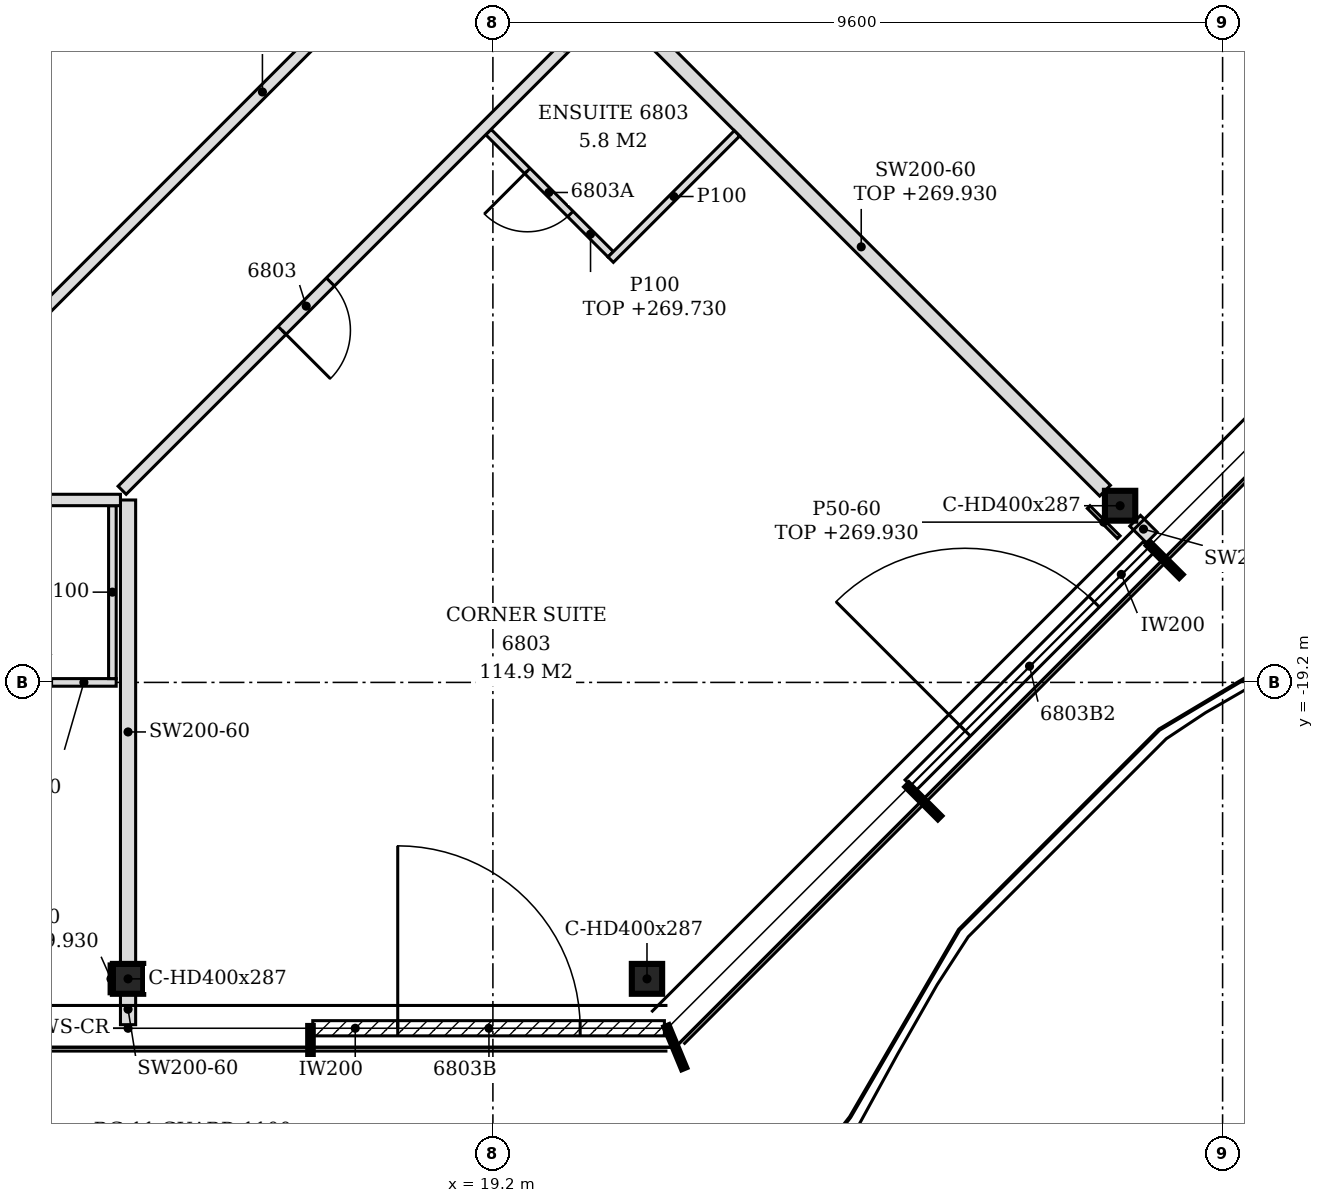
"""IFC4 building model, lengths in metres.
Left out: names, types, materials, properties, quantities, classifications, styles, units other than length and angle.
Written with IfcOpenShell. Run it as: python <this file> out.ifc"""

import sys

from ifc_helpers import new_model, si_unit, direction, frame, frame_2d, origin, origin_2d, place, context, subcontext, project, spatial, polyline, rectangle, i_section, outline, extrude, element, fill, save


model = new_model("IFC4")
c1 = context("Model", 3, precision=1e-05, world=origin(), true_north=direction((0.0, 1.0)))
c2 = subcontext(c1, "Body", "Model", "MODEL_VIEW")
j1 = project(units=[si_unit("LENGTHUNIT", "METRE"), si_unit("PLANEANGLEUNIT", "RADIAN")], contexts=[c1])
p1 = place(None, origin())
s1 = spatial("IfcSite", under=j1, at=p1, CompositionType="ELEMENT")
p2 = place(p1, origin())
s2 = spatial("IfcBuilding", under=s1, at=p2, CompositionType="ELEMENT")
p3 = place(p2, frame((0.0, 0.0, 267.0)))
s3 = spatial("IfcBuildingStorey", under=s2, at=p3, CompositionType="ELEMENT", Elevation=267.0)
for number, where, z_axis, x_axis in (
    (1, (14.4, -23.1, -0.15), (0.0, 0.0, 1.0), (1.0, 0.0, 0.0)),
    (2, (21.227, -23.1, -0.15), (0.0, 0.0, 1.0), (1.0, 0.0, 0.0)),
    (3, (27.451, -16.876, -0.15), (0.0, 0.0, 1.0), (1.0, 0.0, 0.0)),
):
    element("IfcColumn", number, at=place(p3, frame(where, z_axis=z_axis, x_axis=x_axis)), inside=s3, PredefinedType="COLUMN", context=c2, shape_type="SweptSolid", body=[
        extrude(i_section(OverallWidth=0.399, OverallDepth=0.393, WebThickness=0.023, FlangeThickness=0.037, FilletRadius=0.015, at=origin_2d()), origin(), (0.0, 0.0, 1.0), 3.6),
    ])
p4 = place(p3, frame((16.83, -23.75, 0.0), z_axis=(0.0, 0.0, 1.0), x_axis=(1.0, 0.0, 0.0)))
e4 = element("IfcWall", 4, at=p4, inside=s3, PredefinedType="NOTDEFINED", context=c2, shape_type="SweptSolid", body=[
    extrude(rectangle(XDim=4.626, YDim=0.2, at=frame_2d((2.313, 0.0))), origin(), (0.0, 0.0, 1.0), 3.45),
])
p5 = place(p4, frame((1.118, 0.0, 0.0)))
e5 = element("IfcOpeningElement", 5, at=p5, cuts=e4, PredefinedType="OPENING", context=c2, shape_type="SweptSolid", body=[
    extrude(rectangle(XDim=2.4, YDim=2.4, at=frame_2d((1.2, 1.2))), frame((0.0, 0.11, 0.0), z_axis=(0.0, -1.0, 0.0), x_axis=(1.0, 0.0, 0.0)), (0.0, 0.0, 1.0), 0.22),
])
p6 = place(p3, frame((24.693, -20.553, 0.0), z_axis=(0.0, 0.0, 1.0), x_axis=(0.707079231393, 0.707134329907, 0.0)))
e6 = element("IfcWall", 6, at=p6, inside=s3, PredefinedType="NOTDEFINED", context=c2, shape_type="SweptSolid", body=[
    extrude(rectangle(XDim=4.431, YDim=0.2, at=frame_2d((2.215, 0.0))), origin(), (0.0, 0.0, 1.0), 3.45),
])
p7 = place(p6, frame((1.015, 0.0, 0.0)))
e7 = element("IfcOpeningElement", 7, at=p7, cuts=e6, PredefinedType="OPENING", context=c2, shape_type="SweptSolid", body=[
    extrude(rectangle(XDim=2.4, YDim=2.4, at=frame_2d((1.2, 1.2))), frame((0.0, 0.11, 0.0), z_axis=(0.0, -1.0, 0.0), x_axis=(1.0, 0.0, 0.0)), (0.0, 0.0, 1.0), 0.22),
])
p8 = place(p3, frame((14.4, -23.703, 0.0), z_axis=(0.0, 0.0, 1.0), x_axis=(0.0, 1.0, 0.0)))
e8 = element("IfcWall", 8, at=p8, inside=s3, PredefinedType="PARTITIONING", context=c2, shape_type="SweptSolid", body=[
    extrude(rectangle(XDim=0.406, YDim=0.2, at=frame_2d((0.203, 0.0))), origin(), (0.0, 0.0, 1.0), 3.45),
])
p9 = place(p3, frame((14.4, -22.904, 0.0), z_axis=(0.0, 0.0, 1.0), x_axis=(0.0, 1.0, 0.0)))
e9 = element("IfcWall", 9, at=p9, inside=s3, PredefinedType="PARTITIONING", context=c2, shape_type="SweptSolid", body=[
    extrude(outline(polyline([(0.0, 0.0), (6.104, 0.0), (6.104, 3.45), (3.809, 3.45), (3.806, 2.88), (3.598, 2.88), (3.596, 3.45), (0.0, 3.45), (0.0, 0.0)])), frame((0.0, 0.1, 0.0), z_axis=(0.0, -1.0, 0.0), x_axis=(1.0, 0.0, 0.0)), (0.0, 0.0, 1.0), 0.2),
])
p10 = place(p3, frame((11.744, -19.2, 0.0), z_axis=(0.0, 0.0, 1.0), x_axis=(1.0, 0.0, 0.0)))
e10 = element("IfcWall", 10, at=p10, inside=s3, PredefinedType="PARTITIONING", context=c2, shape_type="SweptSolid", body=[
    extrude(rectangle(XDim=2.5, YDim=0.1, at=frame_2d((1.25, 0.0))), origin(), (0.0, 0.0, 1.0), 2.88),
])
p11 = place(p10, frame((0.85, 0.0, 0.0)))
e11 = element("IfcOpeningElement", 11, at=p11, cuts=e10, PredefinedType="OPENING", context=c2, shape_type="SweptSolid", body=[
    extrude(rectangle(XDim=0.8, YDim=2.1, at=frame_2d((0.4, 1.05))), frame((0.0, 0.06, 0.0), z_axis=(0.0, -1.0, 0.0), x_axis=(1.0, 0.0, 0.0)), (0.0, 0.0, 1.0), 0.12),
])
p12 = place(p3, frame((14.194, -19.15, 0.0), z_axis=(0.0, 0.0, 1.0), x_axis=(0.0, 1.0, 0.0)))
e12 = element("IfcWall", 12, at=p12, inside=s3, PredefinedType="PARTITIONING", context=c2, shape_type="SweptSolid", body=[
    extrude(outline(polyline([(0.0, 0.0), (2.275, 0.0), (2.275, 3.45), (0.055, 3.45), (0.053, 2.88), (0.0, 2.88), (0.0, 0.0)])), frame((0.0, 0.05, 0.0), z_axis=(0.0, -1.0, 0.0), x_axis=(1.0, 0.0, 0.0)), (0.0, 0.0, 1.0), 0.1),
])
p13 = place(p3, frame((27.869, -17.293, 0.0), z_axis=(0.0, 0.0, 1.0), x_axis=(-0.707106781187, 0.707106781187, 0.0)))
e13 = element("IfcWall", 13, at=p13, inside=s3, PredefinedType="PARTITIONING", context=c2, shape_type="SweptSolid", body=[
    extrude(rectangle(XDim=0.31, YDim=0.2, at=frame_2d((0.155, 0.0))), origin(), (0.0, 0.0, 1.0), 3.45),
])
p14 = place(p3, frame((1.548, -16.8, 0.0), z_axis=(0.0, 0.0, 1.0), x_axis=(1.0, 0.0, 0.0)))
e14 = element("IfcWall", 14, at=p14, inside=s3, PredefinedType="PARTITIONING", context=c2, shape_type="SweptSolid", body=[
    extrude(outline(polyline([(0.0, 0.0), (12.752, 0.0), (12.752, 3.45), (5.802, 3.45), (5.8, 2.73), (5.502, 2.73), (5.5, 3.45), (0.0, 3.45), (0.0, 0.0)])), frame((0.0, 0.075, 0.0), z_axis=(0.0, -1.0, 0.0), x_axis=(1.0, 0.0, 0.0)), (0.0, 0.0, 1.0), 0.15),
])
p15 = place(p14, frame((3.899, 0.0, 0.0)))
e15 = element("IfcOpeningElement", 15, at=p15, cuts=e14, PredefinedType="OPENING", context=c2, shape_type="SweptSolid", body=[
    extrude(rectangle(XDim=0.9, YDim=2.1, at=frame_2d((0.45, 1.05))), frame((0.0, 0.085, 0.0), z_axis=(0.0, -1.0, 0.0), x_axis=(1.0, 0.0, 0.0)), (0.0, 0.0, 1.0), 0.17),
])
p16 = place(p3, frame((14.322, -16.672, 0.0), z_axis=(0.0, 0.0, 1.0), x_axis=(0.707106781187, 0.707106781187, 0.0)))
e16 = element("IfcWall", 16, at=p16, inside=s3, PredefinedType="PARTITIONING", context=c2, shape_type="SweptSolid", body=[
    extrude(rectangle(XDim=23.452, YDim=0.15, at=frame_2d((11.726, 0.0))), origin(), (0.0, 0.0, 1.0), 2.73),
])
p17 = place(p16, frame((19.357, 0.0, 0.0)))
e17 = element("IfcOpeningElement", 17, at=p17, cuts=e16, PredefinedType="OPENING", context=c2, shape_type="SweptSolid", body=[
    extrude(rectangle(XDim=1.8, YDim=2.1, at=frame_2d((0.9, 1.05))), frame((0.0, 0.085, 0.0), z_axis=(0.0, -1.0, 0.0), x_axis=(1.0, 0.0, 0.0)), (0.0, 0.0, 1.0), 0.17),
])
p18 = place(p16, frame((2.975, 0.0, 0.0)))
e18 = element("IfcOpeningElement", 18, at=p18, cuts=e16, PredefinedType="OPENING", context=c2, shape_type="SweptSolid", body=[
    extrude(rectangle(XDim=0.9, YDim=2.1, at=frame_2d((0.45, 1.05))), frame((0.0, 0.085, 0.0), z_axis=(0.0, -1.0, 0.0), x_axis=(1.0, 0.0, 0.0)), (0.0, 0.0, 1.0), 0.17),
])
p19 = place(p16, frame((12.587, 0.0, 0.0)))
e19 = element("IfcOpeningElement", 19, at=p19, cuts=e16, PredefinedType="OPENING", context=c2, shape_type="SweptSolid", body=[
    extrude(rectangle(XDim=0.9, YDim=2.1, at=frame_2d((0.45, 1.05))), frame((0.0, 0.085, 0.0), z_axis=(0.0, -1.0, 0.0), x_axis=(1.0, 0.0, 0.0)), (0.0, 0.0, 1.0), 0.17),
])
p20 = place(p3, frame((27.254, -16.677, 0.0), z_axis=(0.0, 0.0, 1.0), x_axis=(-0.707120235152, 0.707093326965, 0.0)))
e20 = element("IfcWall", 20, at=p20, inside=s3, PredefinedType="PARTITIONING", context=c2, shape_type="SweptSolid", body=[
    extrude(rectangle(XDim=9.073, YDim=0.2, at=frame_2d((4.537, 0.0))), origin(), (0.0, 0.0, 1.0), 2.93),
])
p21 = place(p3, frame((13.328, -14.272, 0.0), z_axis=(0.0, 0.0, 1.0), x_axis=(0.707121978143, 0.707091583904, 0.0)))
e21 = element("IfcWall", 21, at=p21, inside=s3, PredefinedType="PARTITIONING", context=c2, shape_type="SweptSolid", body=[
    extrude(rectangle(XDim=8.032, YDim=0.15, at=frame_2d((4.016, 0.0))), origin(), (0.0, 0.0, 1.0), 2.88),
])
p22 = place(p3, frame((20.75, -13.568, 0.0), z_axis=(0.0, 0.0, 1.0), x_axis=(-0.707053116953, 0.707160441348, 0.0)))
e22 = element("IfcWall", 22, at=p22, inside=s3, PredefinedType="PARTITIONING", context=c2, shape_type="SweptSolid", body=[
    extrude(rectangle(XDim=2.275, YDim=0.1, at=frame_2d((1.137, 0.0))), origin(), (0.0, 0.0, 1.0), 2.73),
])
p23 = place(p22, frame((0.75, 0.0, 0.0)))
e23 = element("IfcOpeningElement", 23, at=p23, cuts=e22, PredefinedType="OPENING", context=c2, shape_type="SweptSolid", body=[
    extrude(rectangle(XDim=0.8, YDim=2.1, at=frame_2d((0.4, 1.05))), frame((0.0, 0.06, 0.0), z_axis=(0.0, -1.0, 0.0), x_axis=(1.0, 0.0, 0.0)), (0.0, 0.0, 1.0), 0.12),
])
p24 = place(p3, frame((20.75, -13.638, 0.0), z_axis=(0.0, 0.0, 1.0), x_axis=(0.707158722772, 0.707054835785, 0.0)))
e24 = element("IfcWall", 24, at=p24, inside=s3, PredefinedType="PARTITIONING", context=c2, shape_type="SweptSolid", body=[
    extrude(rectangle(XDim=2.35, YDim=0.1, at=frame_2d((1.175, 0.0))), origin(), (0.0, 0.0, 1.0), 3.45),
])
p25 = place(p3, frame((14.176, -23.296, 0.0), z_axis=(0.0, 0.0, 1.0), x_axis=(0.0, 1.0, 0.0)))
e25 = element("IfcWall", 25, at=p25, inside=s3, PredefinedType="PARTITIONING", context=c2, shape_type="SweptSolid", body=[
    extrude(rectangle(XDim=0.393, YDim=0.05, at=frame_2d((0.196, 0.0))), origin(), (0.0, 0.0, 1.0), 2.93),
])
p26 = place(p3, frame((27.434, -17.289, 0.0), z_axis=(0.0, 0.0, 1.0), x_axis=(-0.707106781187, 0.707106781187, 0.0)))
e26 = element("IfcWall", 26, at=p26, inside=s3, PredefinedType="PARTITIONING", context=c2, shape_type="SweptSolid", body=[
    extrude(rectangle(XDim=0.56, YDim=0.05, at=frame_2d((0.28, 0.0))), origin(), (0.0, 0.0, 1.0), 2.93),
])
p27 = place(p5, origin())
e27 = element("IfcDoor", 27, at=p27, inside=s3, OperationType="SINGLE_SWING_LEFT", PredefinedType="DOOR", context=c2, shape_type="SweptSolid", body=[
    extrude(rectangle(XDim=2.4, YDim=2.4, at=frame_2d((1.2, 1.2))), frame((0.0, 0.025, 0.0), z_axis=(0.0, -1.0, 0.0), x_axis=(1.0, 0.0, 0.0)), (0.0, 0.0, 1.0), 0.05),
])
fill(e5, e27)
p28 = place(p7, origin())
e28 = element("IfcDoor", 28, at=p28, inside=s3, OperationType="SINGLE_SWING_LEFT", PredefinedType="DOOR", context=c2, shape_type="SweptSolid", body=[
    extrude(rectangle(XDim=2.4, YDim=2.4, at=frame_2d((1.2, 1.2))), frame((0.0, 0.025, 0.0), z_axis=(0.0, -1.0, 0.0), x_axis=(1.0, 0.0, 0.0)), (0.0, 0.0, 1.0), 0.05),
])
fill(e7, e28)
p29 = place(p18, frame((0.9, 0.0, 0.0), z_axis=(0.0, 0.0, 1.0), x_axis=(-1.0, 0.0, 0.0)))
e29 = element("IfcDoor", 29, at=p29, inside=s3, OperationType="SINGLE_SWING_RIGHT", PredefinedType="DOOR", context=c2, shape_type="SweptSolid", body=[
    extrude(rectangle(XDim=0.9, YDim=2.1, at=frame_2d((0.45, 1.05))), frame((0.0, 0.025, 0.0), z_axis=(0.0, -1.0, 0.0), x_axis=(1.0, 0.0, 0.0)), (0.0, 0.0, 1.0), 0.05),
])
fill(e18, e29)
p30 = place(p23, origin())
e30 = element("IfcDoor", 30, at=p30, inside=s3, OperationType="SINGLE_SWING_RIGHT", PredefinedType="DOOR", context=c2, shape_type="SweptSolid", body=[
    extrude(rectangle(XDim=0.8, YDim=2.1, at=frame_2d((0.4, 1.05))), frame((0.0, 0.025, 0.0), z_axis=(0.0, -1.0, 0.0), x_axis=(1.0, 0.0, 0.0)), (0.0, 0.0, 1.0), 0.05),
])
fill(e23, e30)
save(model, sys.argv[1])
